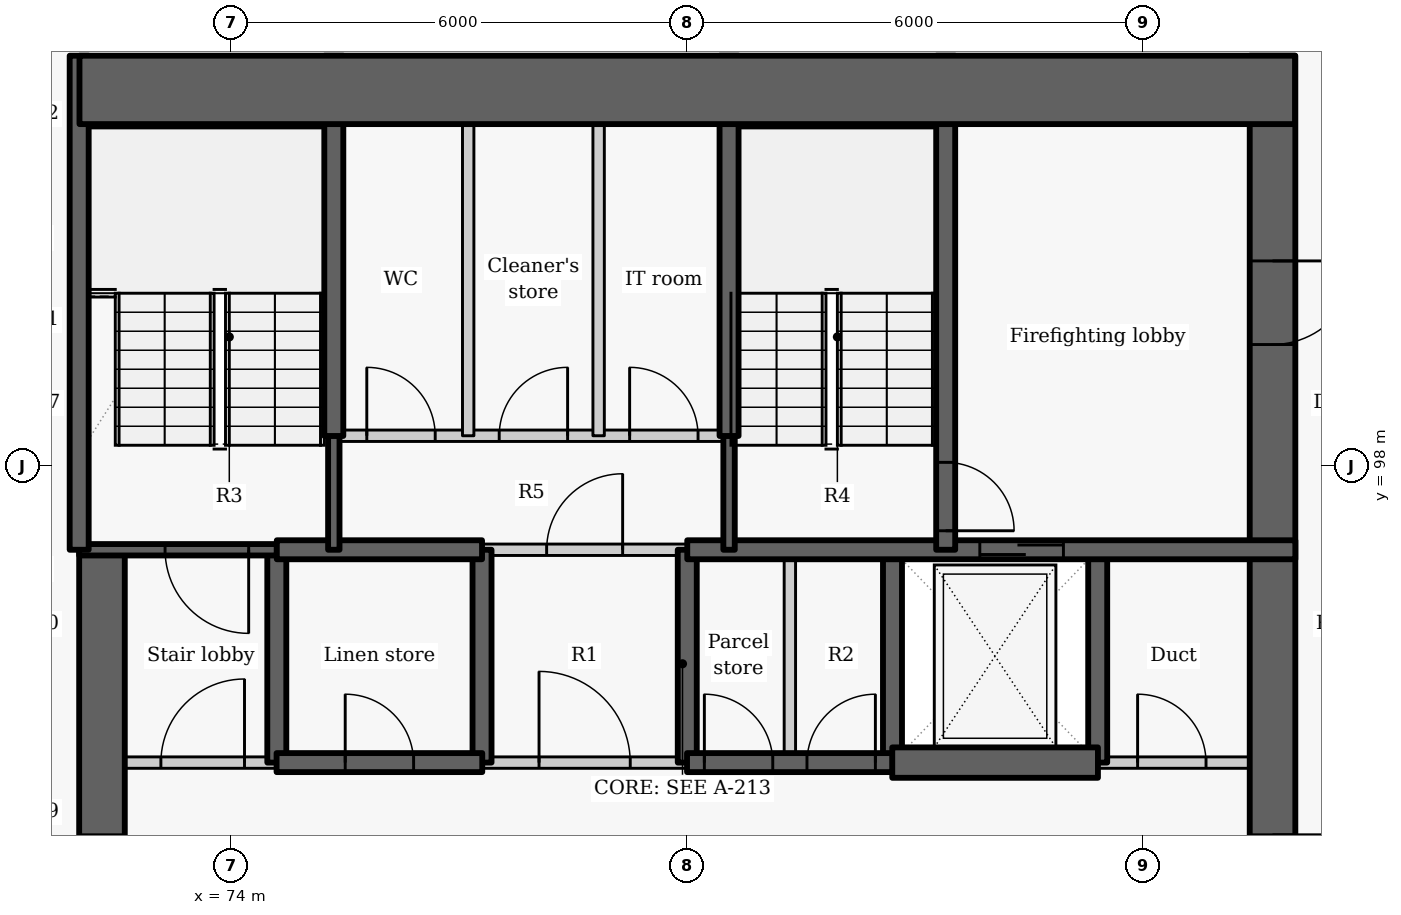
"""IFC4 building model, lengths in metres.
Left out: names, types, materials, properties, quantities, classifications, styles, units other than length and angle.
Written with IfcOpenShell. Run it as: python <this file> out.ifc"""

import sys

from ifc_helpers import new_model, si_unit, direction, frame, frame_2d, origin, place, context, subcontext, project, spatial, rectangle, extrude, element, fill, save


model = new_model("IFC4")
c1 = context("Model", 3, precision=1e-05, world=origin(), true_north=direction((0.0, 1.0)))
c2 = subcontext(c1, "Body", "Model", "MODEL_VIEW")
j1 = project(units=[si_unit("LENGTHUNIT", "METRE"), si_unit("PLANEANGLEUNIT", "RADIAN")], contexts=[c1])
p1 = place(None, origin())
s1 = spatial("IfcSite", under=j1, at=p1, CompositionType="ELEMENT")
p2 = place(p1, origin())
s2 = spatial("IfcBuilding", under=s1, at=p2, CompositionType="ELEMENT")
p3 = place(p2, frame((0.0, 0.0, 61.2)))
s3 = spatial("IfcBuildingStorey", under=s2, at=p3, CompositionType="ELEMENT", Elevation=61.2)
p4 = place(p3, frame((74.6, 94.1, -0.275), z_axis=(0.0, 0.0, 1.0), x_axis=(0.0, 1.0, 0.0)))
e1 = element("IfcWall", 1, at=p4, inside=s3, PredefinedType="SHEAR", context=c2, shape_type="SweptSolid", body=[
    extrude(rectangle(XDim=2.8, YDim=0.25, at=frame_2d((1.4, 0.0))), origin(), (0.0, 0.0, 1.0), 3.3),
])
p5 = place(p3, frame((72.3, 87.8, -0.275), z_axis=(0.0, 0.0, 1.0), x_axis=(0.0, 1.0, 0.0)))
e2 = element("IfcWall", 2, at=p5, inside=s3, PredefinedType="SHEAR", context=c2, shape_type="SweptSolid", body=[
    extrude(rectangle(XDim=9.1, YDim=0.6, at=frame_2d((4.55, 0.0))), origin(), (0.0, 0.0, 1.0), 3.3),
])
p6 = place(p5, frame((3.85, 0.0, 0.275)))
e3 = element("IfcOpeningElement", 3, at=p6, cuts=e2, PredefinedType="OPENING", context=c2, shape_type="SweptSolid", body=[
    extrude(rectangle(XDim=1.5, YDim=2.1, at=frame_2d((0.75, 1.05))), frame((0.0, 0.31, 0.0), z_axis=(0.0, -1.0, 0.0), x_axis=(1.0, 0.0, 0.0)), (0.0, 0.0, 1.0), 0.62),
])
for number, where, z_axis, x_axis in (
    (4, (77.3, 94.1, -0.275), (0.0, 0.0, 1.0), (0.0, 1.0, 0.0)),
    (5, (80.0, 94.1, -0.275), (0.0, 0.0, 1.0), (0.0, 1.0, 0.0)),
    (6, (82.7, 94.1, -0.275), (0.0, 0.0, 1.0), (0.0, 1.0, 0.0)),
    (7, (85.4, 94.1, -0.275), (0.0, 0.0, 1.0), (0.0, 1.0, 0.0)),
):
    element("IfcWall", number, at=place(p3, frame(where, z_axis=z_axis, x_axis=x_axis)), inside=s3, PredefinedType="SHEAR", context=c2, shape_type="SweptSolid", body=[
        extrude(rectangle(XDim=2.8, YDim=0.25, at=frame_2d((1.4, 0.0))), origin(), (0.0, 0.0, 1.0), 3.3),
    ])
p7 = place(p3, frame((87.7, 103.4, -0.275), z_axis=(0.0, 0.0, 1.0), x_axis=(0.0, -1.0, 0.0)))
e8 = element("IfcWall", 8, at=p7, inside=s3, PredefinedType="SHEAR", context=c2, shape_type="SweptSolid", body=[
    extrude(rectangle(XDim=15.6, YDim=0.6, at=frame_2d((7.8, 0.0))), origin(), (0.0, 0.0, 1.0), 3.3),
])
p8 = place(p7, frame((10.25, 0.0, 0.275)))
e9 = element("IfcOpeningElement", 9, at=p8, cuts=e8, PredefinedType="OPENING", context=c2, shape_type="SweptSolid", body=[
    extrude(rectangle(XDim=1.5, YDim=2.1, at=frame_2d((0.75, 1.05))), frame((0.0, 0.31, 0.0), z_axis=(0.0, -1.0, 0.0), x_axis=(1.0, 0.0, 0.0)), (0.0, 0.0, 1.0), 0.62),
])
p9 = place(p7, frame((2.7, 0.0, 0.275)))
e10 = element("IfcOpeningElement", 10, at=p9, cuts=e8, PredefinedType="OPENING", context=c2, shape_type="SweptSolid", body=[
    extrude(rectangle(XDim=1.1, YDim=2.1, at=frame_2d((0.55, 1.05))), frame((0.0, 0.31, 0.0), z_axis=(0.0, -1.0, 0.0), x_axis=(1.0, 0.0, 0.0)), (0.0, 0.0, 1.0), 0.62),
])
p10 = place(p3, frame((72.0, 94.1, 0.0), z_axis=(0.0, 0.0, 1.0), x_axis=(1.0, 0.0, 0.0)))
e11 = element("IfcWall", 11, at=p10, inside=s3, PredefinedType="PARTITIONING", context=c2, shape_type="SweptSolid", body=[
    extrude(rectangle(XDim=2.603, YDim=0.15, at=frame_2d((1.302, 0.0))), origin(), (0.0, 0.0, 1.0), 3.025),
])
p11 = place(p10, frame((1.075, 0.0, 0.0)))
e12 = element("IfcOpeningElement", 12, at=p11, cuts=e11, PredefinedType="OPENING", context=c2, shape_type="SweptSolid", body=[
    extrude(rectangle(XDim=1.1, YDim=2.1, at=frame_2d((0.55, 1.05))), frame((0.0, 0.085, 0.0), z_axis=(0.0, -1.0, 0.0), x_axis=(1.0, 0.0, 0.0)), (0.0, 0.0, 1.0), 0.17),
])
p12 = place(p3, frame((77.297, 94.1, 0.0), z_axis=(0.0, 0.0, 1.0), x_axis=(1.0, 0.0, 0.0)))
e13 = element("IfcWall", 13, at=p12, inside=s3, PredefinedType="PARTITIONING", context=c2, shape_type="SweptSolid", body=[
    extrude(rectangle(XDim=2.706, YDim=0.15, at=frame_2d((1.353, 0.0))), origin(), (0.0, 0.0, 1.0), 3.025),
])
p13 = place(p12, frame((0.753, 0.0, 0.0)))
e14 = element("IfcOpeningElement", 14, at=p13, cuts=e13, PredefinedType="OPENING", context=c2, shape_type="SweptSolid", body=[
    extrude(rectangle(XDim=1.2, YDim=2.1, at=frame_2d((0.6, 1.05))), frame((0.0, 0.085, 0.0), z_axis=(0.0, -1.0, 0.0), x_axis=(1.0, 0.0, 0.0)), (0.0, 0.0, 1.0), 0.17),
])
p14 = place(p3, frame((85.397, 94.1, 0.0), z_axis=(0.0, 0.0, 1.0), x_axis=(1.0, 0.0, 0.0)))
e15 = element("IfcWall", 15, at=p14, inside=s3, PredefinedType="PARTITIONING", context=c2, shape_type="SweptSolid", body=[
    extrude(rectangle(XDim=2.603, YDim=0.15, at=frame_2d((1.302, 0.0))), origin(), (0.0, 0.0, 1.0), 3.025),
])
p15 = place(p14, frame((0.528, 0.0, 0.0)))
e16 = element("IfcOpeningElement", 16, at=p15, cuts=e15, PredefinedType="OPENING", context=c2, shape_type="SweptSolid", body=[
    extrude(rectangle(XDim=0.9, YDim=2.1, at=frame_2d((0.45, 1.05))), frame((0.0, 0.085, 0.0), z_axis=(0.0, -1.0, 0.0), x_axis=(1.0, 0.0, 0.0)), (0.0, 0.0, 1.0), 0.17),
])
p16 = place(p3, frame((74.597, 94.1, -0.275), z_axis=(0.0, 0.0, 1.0), x_axis=(1.0, 0.0, 0.0)))
e17 = element("IfcWall", 17, at=p16, inside=s3, PredefinedType="SHEAR", context=c2, shape_type="SweptSolid", body=[
    extrude(rectangle(XDim=2.706, YDim=0.25, at=frame_2d((1.353, 0.0))), origin(), (0.0, 0.0, 1.0), 3.3),
])
p17 = place(p16, frame((0.903, 0.0, 0.275)))
e18 = element("IfcOpeningElement", 18, at=p17, cuts=e17, PredefinedType="OPENING", context=c2, shape_type="SweptSolid", body=[
    extrude(rectangle(XDim=0.9, YDim=2.1, at=frame_2d((0.45, 1.05))), frame((0.0, 0.135, 0.0), z_axis=(0.0, -1.0, 0.0), x_axis=(1.0, 0.0, 0.0)), (0.0, 0.0, 1.0), 0.27),
])
p18 = place(p3, frame((79.997, 94.1, -0.275), z_axis=(0.0, 0.0, 1.0), x_axis=(1.0, 0.0, 0.0)))
e19 = element("IfcWall", 19, at=p18, inside=s3, PredefinedType="SHEAR", context=c2, shape_type="SweptSolid", body=[
    extrude(rectangle(XDim=2.706, YDim=0.25, at=frame_2d((1.353, 0.0))), origin(), (0.0, 0.0, 1.0), 3.3),
])
p19 = place(p18, frame((0.228, 0.0, 0.275)))
e20 = element("IfcOpeningElement", 20, at=p19, cuts=e19, PredefinedType="OPENING", context=c2, shape_type="SweptSolid", body=[
    extrude(rectangle(XDim=0.9, YDim=2.1, at=frame_2d((0.45, 1.05))), frame((0.0, 0.135, 0.0), z_axis=(0.0, -1.0, 0.0), x_axis=(1.0, 0.0, 0.0)), (0.0, 0.0, 1.0), 0.27),
])
p20 = place(p18, frame((1.578, 0.0, 0.275)))
e21 = element("IfcOpeningElement", 21, at=p20, cuts=e19, PredefinedType="OPENING", context=c2, shape_type="SweptSolid", body=[
    extrude(rectangle(XDim=0.9, YDim=2.1, at=frame_2d((0.45, 1.05))), frame((0.0, 0.135, 0.0), z_axis=(0.0, -1.0, 0.0), x_axis=(1.0, 0.0, 0.0)), (0.0, 0.0, 1.0), 0.27),
])
p21 = place(p3, frame((82.697, 94.1, -0.275), z_axis=(0.0, 0.0, 1.0), x_axis=(1.0, 0.0, 0.0)))
e22 = element("IfcWall", 22, at=p21, inside=s3, PredefinedType="SHEAR", context=c2, shape_type="SweptSolid", body=[
    extrude(rectangle(XDim=2.706, YDim=0.4, at=frame_2d((1.353, 0.0))), origin(), (0.0, 0.0, 1.0), 3.3),
])
p22 = place(p3, frame((74.6, 96.9, -0.275), z_axis=(0.0, 0.0, 1.0), x_axis=(-1.0, 0.0, 0.0)))
e23 = element("IfcWall", 23, at=p22, inside=s3, PredefinedType="SHEAR", context=c2, shape_type="SweptSolid", body=[
    extrude(rectangle(XDim=2.6, YDim=0.15, at=frame_2d((1.3, 0.0))), origin(), (0.0, 0.0, 1.0), 3.3),
])
p23 = place(p22, frame((0.37, 0.0, 0.275)))
e24 = element("IfcOpeningElement", 24, at=p23, cuts=e23, PredefinedType="OPENING", context=c2, shape_type="SweptSolid", body=[
    extrude(rectangle(XDim=1.1, YDim=2.1, at=frame_2d((0.55, 1.05))), frame((0.0, 0.085, 0.0), z_axis=(0.0, -1.0, 0.0), x_axis=(1.0, 0.0, 0.0)), (0.0, 0.0, 1.0), 0.17),
])
p24 = place(p3, frame((74.6, 96.9, -0.275), z_axis=(0.0, 0.0, 1.0), x_axis=(1.0, 0.0, 0.0)))
e25 = element("IfcWall", 25, at=p24, inside=s3, PredefinedType="SHEAR", context=c2, shape_type="SweptSolid", body=[
    extrude(rectangle(XDim=2.7, YDim=0.25, at=frame_2d((1.35, 0.0))), origin(), (0.0, 0.0, 1.0), 3.3),
])
p25 = place(p3, frame((80.0, 96.9, -0.275), z_axis=(0.0, 0.0, 1.0), x_axis=(1.0, 0.0, 0.0)))
e26 = element("IfcWall", 26, at=p25, inside=s3, PredefinedType="SHEAR", context=c2, shape_type="SweptSolid", body=[
    extrude(rectangle(XDim=8.0, YDim=0.25, at=frame_2d((4.0, 0.0))), origin(), (0.0, 0.0, 1.0), 3.3),
])
p26 = place(p25, frame((3.849, 0.0, 0.275)))
e27 = element("IfcOpeningElement", 27, at=p26, cuts=e26, PredefinedType="OPENING", context=c2, shape_type="SweptSolid", body=[
    extrude(rectangle(XDim=1.1, YDim=2.1, at=frame_2d((0.55, 1.05))), frame((0.0, 0.135, 0.0), z_axis=(0.0, -1.0, 0.0), x_axis=(1.0, 0.0, 0.0)), (0.0, 0.0, 1.0), 0.27),
])
p27 = place(p3, frame((77.3, 96.9, 0.0), z_axis=(0.0, 0.0, 1.0), x_axis=(1.0, 0.0, 0.0)))
e28 = element("IfcWall", 28, at=p27, inside=s3, PredefinedType="PARTITIONING", context=c2, shape_type="SweptSolid", body=[
    extrude(rectangle(XDim=2.7, YDim=0.15, at=frame_2d((1.35, 0.0))), origin(), (0.0, 0.0, 1.0), 3.025),
])
p28 = place(p27, frame((0.85, 0.0, 0.0)))
e29 = element("IfcOpeningElement", 29, at=p28, cuts=e28, PredefinedType="OPENING", context=c2, shape_type="SweptSolid", body=[
    extrude(rectangle(XDim=1.0, YDim=2.1, at=frame_2d((0.5, 1.05))), frame((0.0, 0.085, 0.0), z_axis=(0.0, -1.0, 0.0), x_axis=(1.0, 0.0, 0.0)), (0.0, 0.0, 1.0), 0.17),
])
p29 = place(p3, frame((81.35, 94.1, 0.0), z_axis=(0.0, 0.0, 1.0), x_axis=(0.0, 1.0, 0.0)))
e30 = element("IfcWall", 30, at=p29, inside=s3, PredefinedType="PARTITIONING", context=c2, shape_type="SweptSolid", body=[
    extrude(rectangle(XDim=2.8, YDim=0.15, at=frame_2d((1.4, 0.0))), origin(), (0.0, 0.0, 1.0), 3.025),
])
p30 = place(p3, frame((75.35, 96.9, -0.275), z_axis=(0.0, 0.0, 1.0), x_axis=(0.0, 1.0, 0.0)))
e31 = element("IfcWall", 31, at=p30, inside=s3, PredefinedType="SHEAR", context=c2, shape_type="SweptSolid", body=[
    extrude(rectangle(XDim=1.503, YDim=0.15, at=frame_2d((0.751, 0.0))), origin(), (0.0, 0.0, 1.0), 3.3),
])
p31 = place(p3, frame((75.35, 98.397, -0.275), z_axis=(0.0, 0.0, 1.0), x_axis=(0.0, 1.0, 0.0)))
e32 = element("IfcWall", 32, at=p31, inside=s3, PredefinedType="SHEAR", context=c2, shape_type="SweptSolid", body=[
    extrude(rectangle(XDim=5.003, YDim=0.25, at=frame_2d((2.501, 0.0))), origin(), (0.0, 0.0, 1.0), 3.3),
])
p32 = place(p3, frame((72.0, 96.9, -0.275), z_axis=(0.0, 0.0, 1.0), x_axis=(0.0, 1.0, 0.0)))
e33 = element("IfcWall", 33, at=p32, inside=s3, PredefinedType="SHEAR", context=c2, shape_type="SweptSolid", body=[
    extrude(rectangle(XDim=6.5, YDim=0.25, at=frame_2d((3.25, 0.0))), origin(), (0.0, 0.0, 1.0), 3.3),
])
p33 = place(p3, frame((83.4, 103.4, -0.275), z_axis=(0.0, 0.0, 1.0), x_axis=(0.0, -1.0, 0.0)))
e34 = element("IfcWall", 34, at=p33, inside=s3, PredefinedType="SHEAR", context=c2, shape_type="SweptSolid", body=[
    extrude(rectangle(XDim=6.5, YDim=0.25, at=frame_2d((3.25, 0.0))), origin(), (0.0, 0.0, 1.0), 3.3),
])
p34 = place(p33, frame((5.35, 0.0, 0.275)))
e35 = element("IfcOpeningElement", 35, at=p34, cuts=e34, PredefinedType="OPENING", context=c2, shape_type="SweptSolid", body=[
    extrude(rectangle(XDim=0.9, YDim=2.1, at=frame_2d((0.45, 1.05))), frame((0.0, 0.135, 0.0), z_axis=(0.0, -1.0, 0.0), x_axis=(1.0, 0.0, 0.0)), (0.0, 0.0, 1.0), 0.27),
])
p35 = place(p3, frame((80.55, 96.9, -0.275), z_axis=(0.0, 0.0, 1.0), x_axis=(0.0, 1.0, 0.0)))
e36 = element("IfcWall", 36, at=p35, inside=s3, PredefinedType="SHEAR", context=c2, shape_type="SweptSolid", body=[
    extrude(rectangle(XDim=1.503, YDim=0.15, at=frame_2d((0.751, 0.0))), origin(), (0.0, 0.0, 1.0), 3.3),
])
p36 = place(p3, frame((80.55, 98.397, -0.275), z_axis=(0.0, 0.0, 1.0), x_axis=(0.0, 1.0, 0.0)))
e37 = element("IfcWall", 37, at=p36, inside=s3, PredefinedType="SHEAR", context=c2, shape_type="SweptSolid", body=[
    extrude(rectangle(XDim=5.003, YDim=0.25, at=frame_2d((2.501, 0.0))), origin(), (0.0, 0.0, 1.0), 3.3),
])
p37 = place(p3, frame((75.35, 98.4, 0.0), z_axis=(0.0, 0.0, 1.0), x_axis=(1.0, 0.0, 0.0)))
e38 = element("IfcWall", 38, at=p37, inside=s3, PredefinedType="PARTITIONING", context=c2, shape_type="SweptSolid", body=[
    extrude(rectangle(XDim=5.2, YDim=0.15, at=frame_2d((2.6, 0.0))), origin(), (0.0, 0.0, 1.0), 3.025),
])
p38 = place(p37, frame((0.434, 0.0, 0.0)))
e39 = element("IfcOpeningElement", 39, at=p38, cuts=e38, PredefinedType="OPENING", context=c2, shape_type="SweptSolid", body=[
    extrude(rectangle(XDim=0.9, YDim=2.1, at=frame_2d((0.45, 1.05))), frame((0.0, 0.085, 0.0), z_axis=(0.0, -1.0, 0.0), x_axis=(1.0, 0.0, 0.0)), (0.0, 0.0, 1.0), 0.17),
])
p39 = place(p37, frame((2.176, 0.0, 0.0)))
e40 = element("IfcOpeningElement", 40, at=p39, cuts=e38, PredefinedType="OPENING", context=c2, shape_type="SweptSolid", body=[
    extrude(rectangle(XDim=0.9, YDim=2.1, at=frame_2d((0.45, 1.05))), frame((0.0, 0.085, 0.0), z_axis=(0.0, -1.0, 0.0), x_axis=(1.0, 0.0, 0.0)), (0.0, 0.0, 1.0), 0.17),
])
p40 = place(p37, frame((3.892, 0.0, 0.0)))
e41 = element("IfcOpeningElement", 41, at=p40, cuts=e38, PredefinedType="OPENING", context=c2, shape_type="SweptSolid", body=[
    extrude(rectangle(XDim=0.9, YDim=2.1, at=frame_2d((0.45, 1.05))), frame((0.0, 0.085, 0.0), z_axis=(0.0, -1.0, 0.0), x_axis=(1.0, 0.0, 0.0)), (0.0, 0.0, 1.0), 0.17),
])
for number, where, z_axis, x_axis in (
    (42, (77.118, 98.4, 0.0), (0.0, 0.0, 1.0), (0.0, 1.0, 0.0)),
    (43, (78.834, 98.4, 0.0), (0.0, 0.0, 1.0), (0.0, 1.0, 0.0)),
):
    element("IfcWall", number, at=place(p3, frame(where, z_axis=z_axis, x_axis=x_axis)), inside=s3, PredefinedType="PARTITIONING", context=c2, shape_type="SweptSolid", body=[
        extrude(rectangle(XDim=5.0, YDim=0.15, at=frame_2d((2.5, 0.0))), origin(), (0.0, 0.0, 1.0), 3.025),
    ])
p41 = place(p3, frame((72.004, 102.95, -0.275), z_axis=(0.0, 0.0, 1.0), x_axis=(1.0, 0.0, 0.0)))
e44 = element("IfcWall", 44, at=p41, inside=s3, PredefinedType="SHEAR", context=c2, shape_type="SweptSolid", body=[
    extrude(rectangle(XDim=15.992, YDim=0.9, at=frame_2d((7.996, 0.0))), origin(), (0.0, 0.0, 1.0), 3.3),
])
p42 = place(p11, origin())
e45 = element("IfcDoor", 45, at=p42, inside=s3, OperationType="SINGLE_SWING_RIGHT", PredefinedType="DOOR", context=c2, shape_type="SweptSolid", body=[
    extrude(rectangle(XDim=1.1, YDim=2.1, at=frame_2d((0.55, 1.05))), frame((0.0, 0.025, 0.0), z_axis=(0.0, -1.0, 0.0), x_axis=(1.0, 0.0, 0.0)), (0.0, 0.0, 1.0), 0.05),
])
fill(e12, e45)
p43 = place(p17, origin())
e46 = element("IfcDoor", 46, at=p43, inside=s3, OperationType="SINGLE_SWING_LEFT", PredefinedType="DOOR", context=c2, shape_type="SweptSolid", body=[
    extrude(rectangle(XDim=0.9, YDim=2.1, at=frame_2d((0.45, 1.05))), frame((0.0, 0.025, 0.0), z_axis=(0.0, -1.0, 0.0), x_axis=(1.0, 0.0, 0.0)), (0.0, 0.0, 1.0), 0.05),
])
fill(e18, e46)
p44 = place(p13, origin())
e47 = element("IfcDoor", 47, at=p44, inside=s3, OperationType="DOUBLE_DOOR_SINGLE_SWING", PredefinedType="DOOR", context=c2, shape_type="SweptSolid", body=[
    extrude(rectangle(XDim=1.2, YDim=2.1, at=frame_2d((0.6, 1.05))), frame((0.0, 0.025, 0.0), z_axis=(0.0, -1.0, 0.0), x_axis=(1.0, 0.0, 0.0)), (0.0, 0.0, 1.0), 0.05),
])
fill(e14, e47)
p45 = place(p19, origin())
e48 = element("IfcDoor", 48, at=p45, inside=s3, OperationType="SINGLE_SWING_LEFT", PredefinedType="DOOR", context=c2, shape_type="SweptSolid", body=[
    extrude(rectangle(XDim=0.9, YDim=2.1, at=frame_2d((0.45, 1.05))), frame((0.0, 0.025, 0.0), z_axis=(0.0, -1.0, 0.0), x_axis=(1.0, 0.0, 0.0)), (0.0, 0.0, 1.0), 0.05),
])
fill(e20, e48)
p46 = place(p20, origin())
e49 = element("IfcDoor", 49, at=p46, inside=s3, OperationType="SINGLE_SWING_RIGHT", PredefinedType="DOOR", context=c2, shape_type="SweptSolid", body=[
    extrude(rectangle(XDim=0.9, YDim=2.1, at=frame_2d((0.45, 1.05))), frame((0.0, 0.025, 0.0), z_axis=(0.0, -1.0, 0.0), x_axis=(1.0, 0.0, 0.0)), (0.0, 0.0, 1.0), 0.05),
])
fill(e21, e49)
p47 = place(p26, origin())
e50 = element("IfcDoor", 50, at=p47, inside=s3, OperationType="SLIDING_TO_LEFT", PredefinedType="DOOR", context=c2, shape_type="SweptSolid", body=[
    extrude(rectangle(XDim=1.1, YDim=2.1, at=frame_2d((0.55, 1.05))), frame((0.0, 0.025, 0.0), z_axis=(0.0, -1.0, 0.0), x_axis=(1.0, 0.0, 0.0)), (0.0, 0.0, 1.0), 0.05),
])
fill(e27, e50)
p48 = place(p15, origin())
e51 = element("IfcDoor", 51, at=p48, inside=s3, OperationType="SINGLE_SWING_LEFT", PredefinedType="DOOR", context=c2, shape_type="SweptSolid", body=[
    extrude(rectangle(XDim=0.9, YDim=2.1, at=frame_2d((0.45, 1.05))), frame((0.0, 0.025, 0.0), z_axis=(0.0, -1.0, 0.0), x_axis=(1.0, 0.0, 0.0)), (0.0, 0.0, 1.0), 0.05),
])
fill(e16, e51)
p49 = place(p28, origin())
e52 = element("IfcDoor", 52, at=p49, inside=s3, OperationType="SINGLE_SWING_RIGHT", PredefinedType="DOOR", context=c2, shape_type="SweptSolid", body=[
    extrude(rectangle(XDim=1.0, YDim=2.1, at=frame_2d((0.5, 1.05))), frame((0.0, 0.025, 0.0), z_axis=(0.0, -1.0, 0.0), x_axis=(1.0, 0.0, 0.0)), (0.0, 0.0, 1.0), 0.05),
])
fill(e29, e52)
p50 = place(p38, origin())
e53 = element("IfcDoor", 53, at=p50, inside=s3, OperationType="SINGLE_SWING_LEFT", PredefinedType="DOOR", context=c2, shape_type="SweptSolid", body=[
    extrude(rectangle(XDim=0.9, YDim=2.1, at=frame_2d((0.45, 1.05))), frame((0.0, 0.025, 0.0), z_axis=(0.0, -1.0, 0.0), x_axis=(1.0, 0.0, 0.0)), (0.0, 0.0, 1.0), 0.05),
])
fill(e39, e53)
p51 = place(p39, origin())
e54 = element("IfcDoor", 54, at=p51, inside=s3, OperationType="SINGLE_SWING_RIGHT", PredefinedType="DOOR", context=c2, shape_type="SweptSolid", body=[
    extrude(rectangle(XDim=0.9, YDim=2.1, at=frame_2d((0.45, 1.05))), frame((0.0, 0.025, 0.0), z_axis=(0.0, -1.0, 0.0), x_axis=(1.0, 0.0, 0.0)), (0.0, 0.0, 1.0), 0.05),
])
fill(e40, e54)
p52 = place(p40, origin())
e55 = element("IfcDoor", 55, at=p52, inside=s3, OperationType="SINGLE_SWING_LEFT", PredefinedType="DOOR", context=c2, shape_type="SweptSolid", body=[
    extrude(rectangle(XDim=0.9, YDim=2.1, at=frame_2d((0.45, 1.05))), frame((0.0, 0.025, 0.0), z_axis=(0.0, -1.0, 0.0), x_axis=(1.0, 0.0, 0.0)), (0.0, 0.0, 1.0), 0.05),
])
fill(e41, e55)
p53 = place(p23, origin())
e56 = element("IfcDoor", 56, at=p53, inside=s3, OperationType="SINGLE_SWING_LEFT", PredefinedType="DOOR", context=c2, shape_type="SweptSolid", body=[
    extrude(rectangle(XDim=1.1, YDim=2.1, at=frame_2d((0.55, 1.05))), frame((0.0, 0.025, 0.0), z_axis=(0.0, -1.0, 0.0), x_axis=(1.0, 0.0, 0.0)), (0.0, 0.0, 1.0), 0.05),
])
fill(e24, e56)
p54 = place(p34, origin())
e57 = element("IfcDoor", 57, at=p54, inside=s3, OperationType="SINGLE_SWING_RIGHT", PredefinedType="DOOR", context=c2, shape_type="SweptSolid", body=[
    extrude(rectangle(XDim=0.9, YDim=2.1, at=frame_2d((0.45, 1.05))), frame((0.0, 0.025, 0.0), z_axis=(0.0, -1.0, 0.0), x_axis=(1.0, 0.0, 0.0)), (0.0, 0.0, 1.0), 0.05),
])
fill(e35, e57)
p55 = place(p6, origin())
e58 = element("IfcDoor", 58, at=p55, inside=s3, OperationType="DOUBLE_DOOR_SINGLE_SWING", PredefinedType="DOOR", context=c2, shape_type="SweptSolid", body=[
    extrude(rectangle(XDim=1.5, YDim=2.1, at=frame_2d((0.75, 1.05))), frame((0.0, 0.025, 0.0), z_axis=(0.0, -1.0, 0.0), x_axis=(1.0, 0.0, 0.0)), (0.0, 0.0, 1.0), 0.05),
])
fill(e3, e58)
p56 = place(p9, origin())
e59 = element("IfcDoor", 59, at=p56, inside=s3, OperationType="SINGLE_SWING_LEFT", PredefinedType="DOOR", context=c2, shape_type="SweptSolid", body=[
    extrude(rectangle(XDim=1.1, YDim=2.1, at=frame_2d((0.55, 1.05))), frame((0.0, 0.025, 0.0), z_axis=(0.0, -1.0, 0.0), x_axis=(1.0, 0.0, 0.0)), (0.0, 0.0, 1.0), 0.05),
])
fill(e10, e59)
save(model, sys.argv[1])
